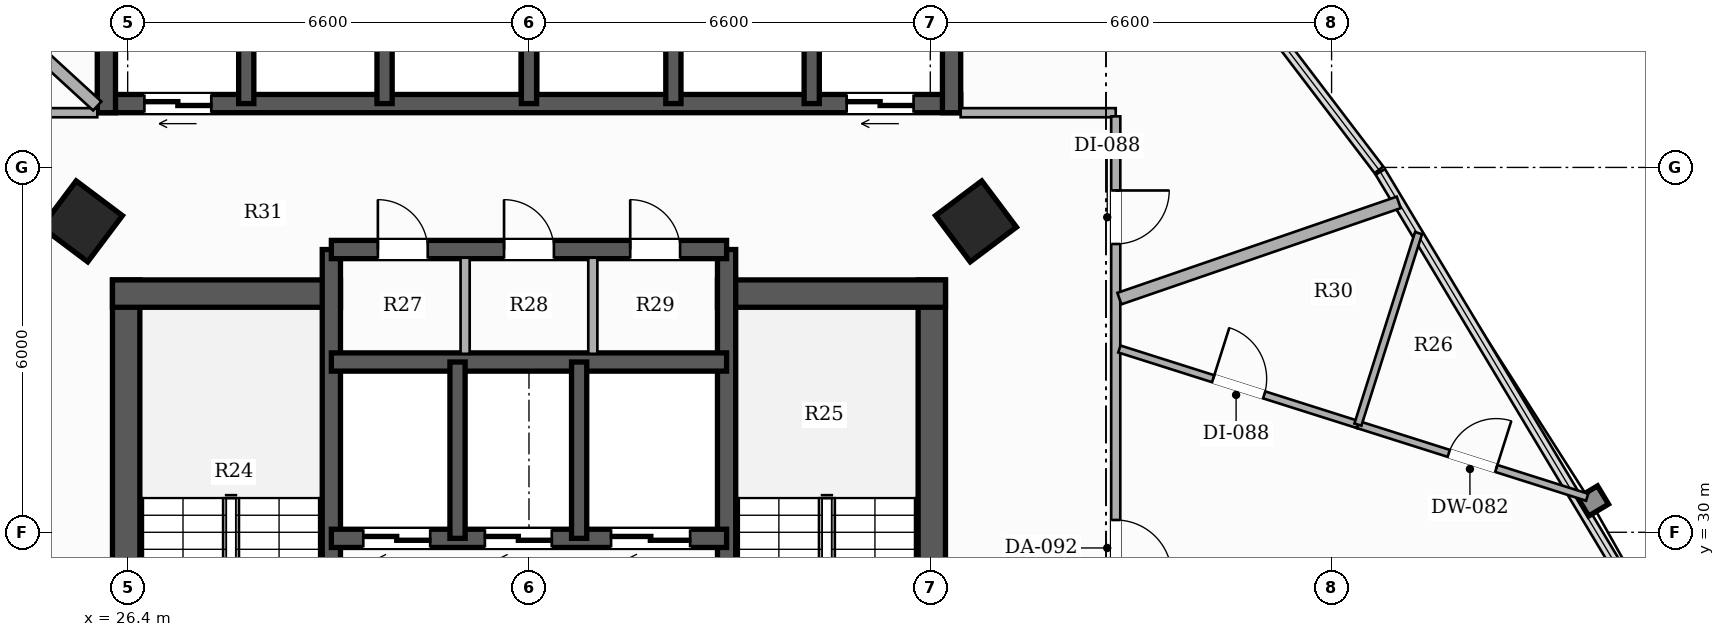
"""IFC4 building model, lengths in metres.
Left out: names, types, materials, properties, quantities, classifications, styles, units other than length and angle.
Written with IfcOpenShell. Run it as: python <this file> out.ifc"""

import sys

from ifc_helpers import new_model, si_unit, direction, frame, frame_2d, origin, origin_2d, place, context, subcontext, project, spatial, rectangle, hollow_rectangle, extrude, element, fill, save


model = new_model("IFC4")
c1 = context("Model", 3, precision=1e-05, world=origin(), true_north=direction((0.0, 1.0)))
c2 = subcontext(c1, "Body", "Model", "MODEL_VIEW")
j1 = project(units=[si_unit("LENGTHUNIT", "METRE"), si_unit("PLANEANGLEUNIT", "RADIAN")], contexts=[c1])
p1 = place(None, origin())
s1 = spatial("IfcSite", under=j1, at=p1, CompositionType="ELEMENT")
p2 = place(p1, origin())
s2 = spatial("IfcBuilding", under=s1, at=p2, CompositionType="ELEMENT")
p3 = place(p2, frame((0.0, 0.0, 36.8)))
s3 = spatial("IfcBuildingStorey", under=s2, at=p3, CompositionType="ELEMENT", Elevation=36.8)
p4 = place(p3, frame((26.375, 26.45, 0.0), z_axis=(0.0, 0.0, 1.0), x_axis=(0.0, 1.0, 0.0)))
e1 = element("IfcWall", 1, at=p4, inside=s3, PredefinedType="SHEAR", context=c2, shape_type="SweptSolid", body=[
    extrude(rectangle(XDim=7.7, YDim=0.45, at=frame_2d((3.85, 0.0))), origin(), (0.0, 0.0, 1.0), 3.3),
])
p5 = place(p3, frame((26.15, 33.925, 0.0), z_axis=(0.0, 0.0, 1.0), x_axis=(1.0, 0.0, 0.0)))
e2 = element("IfcWall", 2, at=p5, inside=s3, PredefinedType="SHEAR", context=c2, shape_type="SweptSolid", body=[
    extrude(rectangle(XDim=3.75, YDim=0.45, at=frame_2d((1.875, 0.0))), origin(), (0.0, 0.0, 1.0), 3.3),
])
p6 = place(p3, frame((39.625, 26.45, 0.0), z_axis=(0.0, 0.0, 1.0), x_axis=(0.0, 1.0, 0.0)))
e3 = element("IfcWall", 3, at=p6, inside=s3, PredefinedType="SHEAR", context=c2, shape_type="SweptSolid", body=[
    extrude(rectangle(XDim=7.7, YDim=0.45, at=frame_2d((3.85, 0.0))), origin(), (0.0, 0.0, 1.0), 3.3),
])
p7 = place(p3, frame((36.1, 33.925, 0.0), z_axis=(0.0, 0.0, 1.0), x_axis=(1.0, 0.0, 0.0)))
e4 = element("IfcWall", 4, at=p7, inside=s3, PredefinedType="SHEAR", context=c2, shape_type="SweptSolid", body=[
    extrude(rectangle(XDim=3.75, YDim=0.45, at=frame_2d((1.875, 0.0))), origin(), (0.0, 0.0, 1.0), 3.3),
])
p8 = place(p3, frame((29.75, 26.45, 0.0), z_axis=(0.0, 0.0, 1.0), x_axis=(0.0, 1.0, 0.0)))
e5 = element("IfcWall", 5, at=p8, inside=s3, PredefinedType="SHEAR", context=c2, shape_type="SweptSolid", body=[
    extrude(rectangle(XDim=8.2, YDim=0.3, at=frame_2d((4.1, 0.0))), origin(), (0.0, 0.0, 1.0), 3.3),
])
p9 = place(p8, frame((0.6, 0.0, 0.0)))
e6 = element("IfcOpeningElement", 6, at=p9, cuts=e5, PredefinedType="OPENING", context=c2, shape_type="SweptSolid", body=[
    extrude(rectangle(XDim=1.05, YDim=2.15, at=frame_2d((0.525, 1.075))), frame((0.0, 0.16, 0.0), z_axis=(0.0, -1.0, 0.0), x_axis=(1.0, 0.0, 0.0)), (0.0, 0.0, 1.0), 0.32),
])
p10 = place(p3, frame((36.25, 26.45, 0.0), z_axis=(0.0, 0.0, 1.0), x_axis=(0.0, 1.0, 0.0)))
e7 = element("IfcWall", 7, at=p10, inside=s3, PredefinedType="SHEAR", context=c2, shape_type="SweptSolid", body=[
    extrude(rectangle(XDim=8.2, YDim=0.3, at=frame_2d((4.1, 0.0))), origin(), (0.0, 0.0, 1.0), 3.3),
])
p11 = place(p10, frame((0.6, 0.0, 0.0)))
e8 = element("IfcOpeningElement", 8, at=p11, cuts=e7, PredefinedType="OPENING", context=c2, shape_type="SweptSolid", body=[
    extrude(rectangle(XDim=1.05, YDim=2.15, at=frame_2d((0.525, 1.075))), frame((0.0, 0.16, 0.0), z_axis=(0.0, -1.0, 0.0), x_axis=(1.0, 0.0, 0.0)), (0.0, 0.0, 1.0), 0.32),
])
p12 = place(p3, frame((36.25, 29.9, 0.0), z_axis=(0.0, 0.0, 1.0), x_axis=(-1.0, 0.0, 0.0)))
e9 = element("IfcWall", 9, at=p12, inside=s3, PredefinedType="SHEAR", context=c2, shape_type="SweptSolid", body=[
    extrude(rectangle(XDim=6.5, YDim=0.3, at=frame_2d((3.25, 0.0))), origin(), (0.0, 0.0, 1.0), 3.3),
])
p13 = place(p12, frame((4.875, 0.0, 0.0)))
e10 = element("IfcOpeningElement", 10, at=p13, cuts=e9, PredefinedType="OPENING", context=c2, shape_type="SweptSolid", body=[
    extrude(rectangle(XDim=1.1, YDim=2.2, at=frame_2d((0.55, 1.1))), frame((0.0, 0.16, 0.0), z_axis=(0.0, -1.0, 0.0), x_axis=(1.0, 0.0, 0.0)), (0.0, 0.0, 1.0), 0.32),
])
p14 = place(p12, frame((2.875, 0.0, 0.0)))
e11 = element("IfcOpeningElement", 11, at=p14, cuts=e9, PredefinedType="OPENING", context=c2, shape_type="SweptSolid", body=[
    extrude(rectangle(XDim=1.1, YDim=2.2, at=frame_2d((0.55, 1.1))), frame((0.0, 0.16, 0.0), z_axis=(0.0, -1.0, 0.0), x_axis=(1.0, 0.0, 0.0)), (0.0, 0.0, 1.0), 0.32),
])
p15 = place(p12, frame((0.6, 0.0, 0.0)))
e12 = element("IfcOpeningElement", 12, at=p15, cuts=e9, PredefinedType="OPENING", context=c2, shape_type="SweptSolid", body=[
    extrude(rectangle(XDim=1.3, YDim=2.2, at=frame_2d((0.65, 1.1))), frame((0.0, 0.16, 0.0), z_axis=(0.0, -1.0, 0.0), x_axis=(1.0, 0.0, 0.0)), (0.0, 0.0, 1.0), 0.32),
])
p16 = place(p3, frame((29.75, 32.8, 0.0), z_axis=(0.0, 0.0, 1.0), x_axis=(1.0, 0.0, 0.0)))
e13 = element("IfcWall", 13, at=p16, inside=s3, PredefinedType="SHEAR", context=c2, shape_type="SweptSolid", body=[
    extrude(rectangle(XDim=6.5, YDim=0.3, at=frame_2d((3.25, 0.0))), origin(), (0.0, 0.0, 1.0), 3.3),
])
for number, where, z_axis, x_axis in (
    (14, (31.825, 29.9, 0.0), (0.0, 0.0, 1.0), (0.0, 1.0, 0.0)),
    (15, (33.825, 29.9, 0.0), (0.0, 0.0, 1.0), (0.0, 1.0, 0.0)),
):
    element("IfcWall", number, at=place(p3, frame(where, z_axis=z_axis, x_axis=x_axis)), inside=s3, PredefinedType="SHEAR", context=c2, shape_type="SweptSolid", body=[
        extrude(rectangle(XDim=2.9, YDim=0.25, at=frame_2d((1.45, 0.0))), origin(), (0.0, 0.0, 1.0), 3.3),
    ])
p17 = place(p3, frame((29.75, 34.65, 0.0), z_axis=(0.0, 0.0, 1.0), x_axis=(1.0, 0.0, 0.0)))
e16 = element("IfcWall", 16, at=p17, inside=s3, PredefinedType="SHEAR", context=c2, shape_type="SweptSolid", body=[
    extrude(rectangle(XDim=6.5, YDim=0.3, at=frame_2d((3.25, 0.0))), origin(), (0.0, 0.0, 1.0), 3.3),
])
p18 = place(p17, frame((0.765, 0.0, 0.0)))
e17 = element("IfcOpeningElement", 17, at=p18, cuts=e16, PredefinedType="OPENING", context=c2, shape_type="SweptSolid", body=[
    extrude(rectangle(XDim=0.82, YDim=2.1, at=frame_2d((0.41, 1.05))), frame((0.0, 0.16, 0.0), z_axis=(0.0, -1.0, 0.0), x_axis=(1.0, 0.0, 0.0)), (0.0, 0.0, 1.0), 0.32),
])
p19 = place(p17, frame((2.84, 0.0, 0.0)))
e18 = element("IfcOpeningElement", 18, at=p19, cuts=e16, PredefinedType="OPENING", context=c2, shape_type="SweptSolid", body=[
    extrude(rectangle(XDim=0.82, YDim=2.1, at=frame_2d((0.41, 1.05))), frame((0.0, 0.16, 0.0), z_axis=(0.0, -1.0, 0.0), x_axis=(1.0, 0.0, 0.0)), (0.0, 0.0, 1.0), 0.32),
])
p20 = place(p17, frame((4.915, 0.0, 0.0)))
e19 = element("IfcOpeningElement", 19, at=p20, cuts=e16, PredefinedType="OPENING", context=c2, shape_type="SweptSolid", body=[
    extrude(rectangle(XDim=0.82, YDim=2.1, at=frame_2d((0.41, 1.05))), frame((0.0, 0.16, 0.0), z_axis=(0.0, -1.0, 0.0), x_axis=(1.0, 0.0, 0.0)), (0.0, 0.0, 1.0), 0.32),
])
p21 = place(p3, frame((40.1, 37.05, 0.0), z_axis=(0.0, 0.0, 1.0), x_axis=(-1.0, 0.0, 0.0)))
e20 = element("IfcWall", 20, at=p21, inside=s3, PredefinedType="SHEAR", context=c2, shape_type="SweptSolid", body=[
    extrude(rectangle(XDim=14.2, YDim=0.3, at=frame_2d((7.1, 0.0))), origin(), (0.0, 0.0, 1.0), 3.3),
])
p22 = place(p21, frame((12.325, 0.0, 0.0)))
e21 = element("IfcOpeningElement", 21, at=p22, cuts=e20, PredefinedType="OPENING", context=c2, shape_type="SweptSolid", body=[
    extrude(rectangle(XDim=1.1, YDim=2.2, at=frame_2d((0.55, 1.1))), frame((0.0, 0.16, 0.0), z_axis=(0.0, -1.0, 0.0), x_axis=(1.0, 0.0, 0.0)), (0.0, 0.0, 1.0), 0.32),
])
p23 = place(p21, frame((0.775, 0.0, 0.0)))
e22 = element("IfcOpeningElement", 22, at=p23, cuts=e20, PredefinedType="OPENING", context=c2, shape_type="SweptSolid", body=[
    extrude(rectangle(XDim=1.1, YDim=2.2, at=frame_2d((0.55, 1.1))), frame((0.0, 0.16, 0.0), z_axis=(0.0, -1.0, 0.0), x_axis=(1.0, 0.0, 0.0)), (0.0, 0.0, 1.0), 0.32),
])
for number, where, z_axis, x_axis in (
    (23, (26.05, 36.9, 0.0), (0.0, 0.0, 1.0), (0.0, 1.0, 0.0)),
    (24, (39.95, 36.9, 0.0), (0.0, 0.0, 1.0), (0.0, 1.0, 0.0)),
):
    element("IfcWall", number, at=place(p3, frame(where, z_axis=z_axis, x_axis=x_axis)), inside=s3, PredefinedType="SHEAR", context=c2, shape_type="SweptSolid", body=[
        extrude(rectangle(XDim=2.85, YDim=0.3, at=frame_2d((1.425, 0.0))), origin(), (0.0, 0.0, 1.0), 3.3),
    ])
for number, where, z_axis, x_axis in (
    (25, (28.35, 37.05, 0.0), (0.0, 0.0, 1.0), (0.0, 1.0, 0.0)),
    (26, (30.625, 37.05, 0.0), (0.0, 0.0, 1.0), (0.0, 1.0, 0.0)),
    (27, (33.0, 37.05, 0.0), (0.0, 0.0, 1.0), (0.0, 1.0, 0.0)),
    (28, (35.375, 37.05, 0.0), (0.0, 0.0, 1.0), (0.0, 1.0, 0.0)),
    (29, (37.65, 37.05, 0.0), (0.0, 0.0, 1.0), (0.0, 1.0, 0.0)),
):
    element("IfcWall", number, at=place(p3, frame(where, z_axis=z_axis, x_axis=x_axis)), inside=s3, PredefinedType="SHEAR", context=c2, shape_type="SweptSolid", body=[
        extrude(rectangle(XDim=2.55, YDim=0.25, at=frame_2d((1.275, 0.0))), origin(), (0.0, 0.0, 1.0), 3.3),
    ])
for number, where, z_axis, x_axis in (
    (30, (25.648, 35.113, 0.0), (0.0, 0.0, 1.0), (0.6, 0.8, 0.0)),
    (31, (40.352, 35.113, 0.0), (0.0, 0.0, 1.0), (-0.6, 0.8, 0.0)),
):
    element("IfcColumn", number, at=place(p3, frame(where, z_axis=z_axis, x_axis=x_axis)), inside=s3, PredefinedType="COLUMN", context=c2, shape_type="SweptSolid", body=[
        extrude(hollow_rectangle(XDim=0.95, YDim=0.95, WallThickness=0.032, at=origin_2d()), origin(), (0.0, 0.0, 1.0), 3.3),
    ])
for number, where, z_axis, x_axis in (
    (32, (31.95, 32.935, 0.0), (0.0, 0.0, 1.0), (0.0, 1.0, 0.0)),
    (33, (34.05, 32.935, 0.0), (0.0, 0.0, 1.0), (0.0, 1.0, 0.0)),
):
    element("IfcWall", number, at=place(p3, frame(where, z_axis=z_axis, x_axis=x_axis)), inside=s3, PredefinedType="PARTITIONING", context=c2, shape_type="SweptSolid", body=[
        extrude(rectangle(XDim=1.58, YDim=0.15, at=frame_2d((0.79, 0.0))), origin(), (0.0, 0.0, 1.0), 3.06),
    ])
p24 = place(p3, frame((40.1, 36.9, 0.0), z_axis=(0.0, 0.0, 1.0), x_axis=(1.0, 0.0, 0.0)))
e34 = element("IfcWall", 34, at=p24, inside=s3, PredefinedType="PARTITIONING", context=c2, shape_type="SweptSolid", body=[
    extrude(rectangle(XDim=2.55, YDim=0.15, at=frame_2d((1.275, 0.0))), origin(), (0.0, 0.0, 1.0), 2.413),
])
p25 = place(p3, frame((42.65, 36.84, 0.0), z_axis=(0.0, 0.0, 1.0), x_axis=(0.0, -1.0, 0.0)))
e35 = element("IfcWall", 35, at=p25, inside=s3, PredefinedType="PARTITIONING", context=c2, shape_type="SweptSolid", body=[
    extrude(rectangle(XDim=25.04, YDim=0.15, at=frame_2d((12.52, 0.0))), origin(), (0.0, 0.0, 1.0), 2.413),
])
p26 = place(p25, frame((1.219, 0.0, 0.0)))
e36 = element("IfcOpeningElement", 36, at=p26, cuts=e35, PredefinedType="OPENING", context=c2, shape_type="SweptSolid", body=[
    extrude(rectangle(XDim=0.88, YDim=2.1, at=frame_2d((0.44, 1.05))), frame((0.0, 0.085, 0.0), z_axis=(0.0, -1.0, 0.0), x_axis=(1.0, 0.0, 0.0)), (0.0, 0.0, 1.0), 0.17),
])
p27 = place(p25, frame((21.047, 0.0, 0.0)))
e37 = element("IfcOpeningElement", 37, at=p27, cuts=e35, PredefinedType="OPENING", context=c2, shape_type="SweptSolid", body=[
    extrude(rectangle(XDim=0.88, YDim=2.1, at=frame_2d((0.44, 1.05))), frame((0.0, 0.085, 0.0), z_axis=(0.0, -1.0, 0.0), x_axis=(1.0, 0.0, 0.0)), (0.0, 0.0, 1.0), 0.17),
])
p28 = place(p25, frame((16.029, 0.0, 0.0)))
e38 = element("IfcOpeningElement", 38, at=p28, cuts=e35, PredefinedType="OPENING", context=c2, shape_type="SweptSolid", body=[
    extrude(rectangle(XDim=0.92, YDim=2.15, at=frame_2d((0.46, 1.075))), frame((0.0, 0.085, 0.0), z_axis=(0.0, -1.0, 0.0), x_axis=(1.0, 0.0, 0.0)), (0.0, 0.0, 1.0), 0.17),
])
p29 = place(p25, frame((12.486, 0.0, 0.0)))
e39 = element("IfcOpeningElement", 39, at=p29, cuts=e35, PredefinedType="OPENING", context=c2, shape_type="SweptSolid", body=[
    extrude(rectangle(XDim=0.88, YDim=2.1, at=frame_2d((0.44, 1.05))), frame((0.0, 0.085, 0.0), z_axis=(0.0, -1.0, 0.0), x_axis=(1.0, 0.0, 0.0)), (0.0, 0.0, 1.0), 0.17),
])
p30 = place(p25, frame((6.638, 0.0, 0.0)))
e40 = element("IfcOpeningElement", 40, at=p30, cuts=e35, PredefinedType="OPENING", context=c2, shape_type="SweptSolid", body=[
    extrude(rectangle(XDim=0.92, YDim=2.15, at=frame_2d((0.46, 1.075))), frame((0.0, 0.085, 0.0), z_axis=(0.0, -1.0, 0.0), x_axis=(1.0, 0.0, 0.0)), (0.0, 0.0, 1.0), 0.17),
])
p31 = place(p3, frame((23.41, 36.9, 0.0), z_axis=(0.0, 0.0, 1.0), x_axis=(1.0, 0.0, 0.0)))
e41 = element("IfcWall", 41, at=p31, inside=s3, PredefinedType="PARTITIONING", context=c2, shape_type="SweptSolid", body=[
    extrude(rectangle(XDim=2.49, YDim=0.15, at=frame_2d((1.245, 0.0))), origin(), (0.0, 0.0, 1.0), 2.413),
])
p32 = place(p3, frame((25.9, 37.01, 0.0), z_axis=(0.0, 0.0, 1.0), x_axis=(-0.737010798249, 0.675880968266, 0.0)))
e42 = element("IfcWall", 42, at=p32, inside=s3, PredefinedType="PARTITIONING", context=c2, shape_type="SweptSolid", body=[
    extrude(rectangle(XDim=5.02, YDim=0.2, at=frame_2d((2.51, 0.0))), origin(), (0.0, 0.0, 1.0), 3.06),
])
p33 = place(p3, frame((47.304, 35.425, 0.0), z_axis=(0.0, 0.0, 1.0), x_axis=(-0.945506397197, -0.325603520956, 0.0)))
e43 = element("IfcWall", 43, at=p33, inside=s3, PredefinedType="PARTITIONING", context=c2, shape_type="SweptSolid", body=[
    extrude(rectangle(XDim=4.859, YDim=0.2, at=frame_2d((2.429, 0.0))), origin(), (0.0, 0.0, 1.0), 3.06),
])
p34 = place(p3, frame((46.633, 31.771, 0.0), z_axis=(0.0, 0.0, 1.0), x_axis=(0.953252758263, -0.302174087016, 0.0)))
e44 = element("IfcWall", 44, at=p34, inside=s3, PredefinedType="PARTITIONING", context=c2, shape_type="SweptSolid", body=[
    extrude(rectangle(XDim=3.955, YDim=0.12, at=frame_2d((1.978, 0.0))), origin(), (0.0, 0.0, 1.0), 3.06),
])
p35 = place(p34, frame((1.567, 0.0, 0.0)))
e45 = element("IfcOpeningElement", 45, at=p35, cuts=e44, PredefinedType="OPENING", context=c2, shape_type="SweptSolid", body=[
    extrude(rectangle(XDim=0.82, YDim=2.1, at=frame_2d((0.41, 1.05))), frame((0.0, 0.07, 0.0), z_axis=(0.0, -1.0, 0.0), x_axis=(1.0, 0.0, 0.0)), (0.0, 0.0, 1.0), 0.14),
])
p36 = place(p3, frame((42.71, 33.014, 0.0), z_axis=(0.0, 0.0, 1.0), x_axis=(0.953299814988, -0.302025599484, 0.0)))
e46 = element("IfcWall", 46, at=p36, inside=s3, PredefinedType="PARTITIONING", context=c2, shape_type="SweptSolid", body=[
    extrude(rectangle(XDim=4.115, YDim=0.12, at=frame_2d((2.058, 0.0))), origin(), (0.0, 0.0, 1.0), 3.06),
])
p37 = place(p36, frame((1.618, 0.0, 0.0)))
e47 = element("IfcOpeningElement", 47, at=p37, cuts=e46, PredefinedType="OPENING", context=c2, shape_type="SweptSolid", body=[
    extrude(rectangle(XDim=0.88, YDim=2.1, at=frame_2d((0.44, 1.05))), frame((0.0, 0.07, 0.0), z_axis=(0.0, -1.0, 0.0), x_axis=(1.0, 0.0, 0.0)), (0.0, 0.0, 1.0), 0.14),
])
p38 = place(p3, frame((46.633, 31.771, 0.0), z_axis=(0.0, 0.0, 1.0), x_axis=(0.301799891186, 0.953371294764, 0.0)))
e48 = element("IfcWall", 48, at=p38, inside=s3, PredefinedType="PARTITIONING", context=c2, shape_type="SweptSolid", body=[
    extrude(rectangle(XDim=3.303, YDim=0.12, at=frame_2d((1.651, 0.0))), origin(), (0.0, 0.0, 1.0), 3.06),
])
p39 = place(p13, origin())
e49 = element("IfcDoor", 49, at=p39, inside=s3, OperationType="DOUBLE_DOOR_SLIDING", PredefinedType="DOOR", context=c2, shape_type="SweptSolid", body=[
    extrude(rectangle(XDim=1.1, YDim=2.2, at=frame_2d((0.55, 1.1))), frame((0.0, 0.025, 0.0), z_axis=(0.0, -1.0, 0.0), x_axis=(1.0, 0.0, 0.0)), (0.0, 0.0, 1.0), 0.05),
])
fill(e10, e49)
p40 = place(p14, origin())
e50 = element("IfcDoor", 50, at=p40, inside=s3, OperationType="DOUBLE_DOOR_SLIDING", PredefinedType="DOOR", context=c2, shape_type="SweptSolid", body=[
    extrude(rectangle(XDim=1.1, YDim=2.2, at=frame_2d((0.55, 1.1))), frame((0.0, 0.025, 0.0), z_axis=(0.0, -1.0, 0.0), x_axis=(1.0, 0.0, 0.0)), (0.0, 0.0, 1.0), 0.05),
])
fill(e11, e50)
p41 = place(p15, origin())
e51 = element("IfcDoor", 51, at=p41, inside=s3, OperationType="DOUBLE_DOOR_SLIDING", PredefinedType="DOOR", context=c2, shape_type="SweptSolid", body=[
    extrude(rectangle(XDim=1.3, YDim=2.2, at=frame_2d((0.65, 1.1))), frame((0.0, 0.025, 0.0), z_axis=(0.0, -1.0, 0.0), x_axis=(1.0, 0.0, 0.0)), (0.0, 0.0, 1.0), 0.05),
])
fill(e12, e51)
p42 = place(p22, origin())
e52 = element("IfcDoor", 52, at=p42, inside=s3, OperationType="DOUBLE_DOOR_SLIDING", PredefinedType="DOOR", context=c2, shape_type="SweptSolid", body=[
    extrude(rectangle(XDim=1.1, YDim=2.2, at=frame_2d((0.55, 1.1))), frame((0.0, 0.025, 0.0), z_axis=(0.0, -1.0, 0.0), x_axis=(1.0, 0.0, 0.0)), (0.0, 0.0, 1.0), 0.05),
])
fill(e21, e52)
p43 = place(p23, origin())
e53 = element("IfcDoor", 53, at=p43, inside=s3, OperationType="DOUBLE_DOOR_SLIDING", PredefinedType="DOOR", context=c2, shape_type="SweptSolid", body=[
    extrude(rectangle(XDim=1.1, YDim=2.2, at=frame_2d((0.55, 1.1))), frame((0.0, 0.025, 0.0), z_axis=(0.0, -1.0, 0.0), x_axis=(1.0, 0.0, 0.0)), (0.0, 0.0, 1.0), 0.05),
])
fill(e22, e53)
p44 = place(p18, origin())
e54 = element("IfcDoor", 54, at=p44, inside=s3, OperationType="SINGLE_SWING_LEFT", PredefinedType="DOOR", context=c2, shape_type="SweptSolid", body=[
    extrude(rectangle(XDim=0.82, YDim=2.1, at=frame_2d((0.41, 1.05))), frame((0.0, 0.025, 0.0), z_axis=(0.0, -1.0, 0.0), x_axis=(1.0, 0.0, 0.0)), (0.0, 0.0, 1.0), 0.05),
])
fill(e17, e54)
p45 = place(p19, origin())
e55 = element("IfcDoor", 55, at=p45, inside=s3, OperationType="SINGLE_SWING_LEFT", PredefinedType="DOOR", context=c2, shape_type="SweptSolid", body=[
    extrude(rectangle(XDim=0.82, YDim=2.1, at=frame_2d((0.41, 1.05))), frame((0.0, 0.025, 0.0), z_axis=(0.0, -1.0, 0.0), x_axis=(1.0, 0.0, 0.0)), (0.0, 0.0, 1.0), 0.05),
])
fill(e18, e55)
p46 = place(p20, origin())
e56 = element("IfcDoor", 56, at=p46, inside=s3, OperationType="SINGLE_SWING_LEFT", PredefinedType="DOOR", context=c2, shape_type="SweptSolid", body=[
    extrude(rectangle(XDim=0.82, YDim=2.1, at=frame_2d((0.41, 1.05))), frame((0.0, 0.025, 0.0), z_axis=(0.0, -1.0, 0.0), x_axis=(1.0, 0.0, 0.0)), (0.0, 0.0, 1.0), 0.05),
])
fill(e19, e56)
p47 = place(p26, origin())
e57 = element("IfcDoor", 57, at=p47, inside=s3, OperationType="SINGLE_SWING_LEFT", PredefinedType="DOOR", context=c2, shape_type="SweptSolid", body=[
    extrude(rectangle(XDim=0.88, YDim=2.1, at=frame_2d((0.44, 1.05))), frame((0.0, 0.025, 0.0), z_axis=(0.0, -1.0, 0.0), x_axis=(1.0, 0.0, 0.0)), (0.0, 0.0, 1.0), 0.05),
])
fill(e36, e57)
p48 = place(p30, origin())
e58 = element("IfcDoor", 58, at=p48, inside=s3, OperationType="SINGLE_SWING_RIGHT", PredefinedType="DOOR", context=c2, shape_type="SweptSolid", body=[
    extrude(rectangle(XDim=0.92, YDim=2.15, at=frame_2d((0.46, 1.075))), frame((0.0, 0.025, 0.0), z_axis=(0.0, -1.0, 0.0), x_axis=(1.0, 0.0, 0.0)), (0.0, 0.0, 1.0), 0.05),
])
fill(e40, e58)
p49 = place(p35, origin())
e59 = element("IfcDoor", 59, at=p49, inside=s3, OperationType="SINGLE_SWING_RIGHT", PredefinedType="DOOR", context=c2, shape_type="SweptSolid", body=[
    extrude(rectangle(XDim=0.82, YDim=2.1, at=frame_2d((0.41, 1.05))), frame((0.0, 0.025, 0.0), z_axis=(0.0, -1.0, 0.0), x_axis=(1.0, 0.0, 0.0)), (0.0, 0.0, 1.0), 0.05),
])
fill(e45, e59)
p50 = place(p37, origin())
e60 = element("IfcDoor", 60, at=p50, inside=s3, OperationType="SINGLE_SWING_LEFT", PredefinedType="DOOR", context=c2, shape_type="SweptSolid", body=[
    extrude(rectangle(XDim=0.88, YDim=2.1, at=frame_2d((0.44, 1.05))), frame((0.0, 0.025, 0.0), z_axis=(0.0, -1.0, 0.0), x_axis=(1.0, 0.0, 0.0)), (0.0, 0.0, 1.0), 0.05),
])
fill(e47, e60)
save(model, sys.argv[1])
